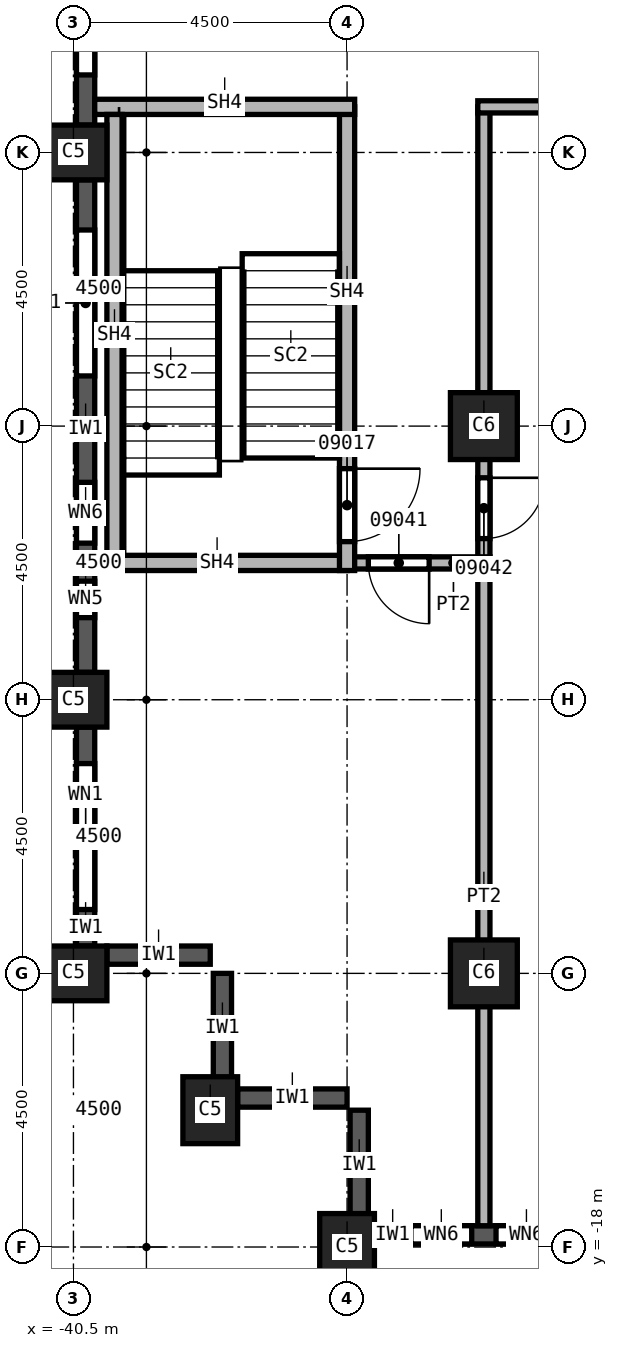
"""IFC4 building model, lengths in metres.
Left out: names, types, materials, properties, quantities, classifications, styles, units other than length and angle.
Written with IfcOpenShell. Run it as: python <this file> out.ifc"""

import sys

from ifc_helpers import new_model, si_unit, direction, frame, frame_2d, origin, origin_2d, place, context, subcontext, project, spatial, rectangle, extrude, element, fill, save


model = new_model("IFC4")
c1 = context("Model", 3, precision=1e-05, world=origin(), true_north=direction((0.0, 1.0)))
c2 = subcontext(c1, "Body", "Model", "MODEL_VIEW")
j1 = project(units=[si_unit("LENGTHUNIT", "METRE"), si_unit("PLANEANGLEUNIT", "RADIAN")], contexts=[c1])
p1 = place(None, origin())
s1 = spatial("IfcSite", under=j1, at=p1, CompositionType="ELEMENT")
p2 = place(p1, origin())
s2 = spatial("IfcBuilding", under=s1, at=p2, CompositionType="ELEMENT")
p3 = place(p2, frame((0.0, 0.0, 162.0)))
s3 = spatial("IfcBuildingStorey", under=s2, at=p3, CompositionType="ELEMENT", Elevation=162.0)
for number, where, z_axis, x_axis in (
    (1, (-40.5, 0.0, 0.0), (0.0, 0.0, 1.0), (0.0, 1.0, 0.0)),
    (2, (-40.5, -9.0, 0.0), (0.0, 0.0, 1.0), (0.0, 1.0, 0.0)),
    (3, (-40.5, -13.5, 0.0), (0.0, 0.0, 1.0), (0.0, 1.0, 0.0)),
    (4, (-38.25, -15.75, 0.0), (0.0, 0.0, 1.0), (1.0, 0.0, 0.0)),
    (5, (-36.0, -18.0, 0.0), (0.0, 0.0, 1.0), (1.0, 0.0, 0.0)),
):
    element("IfcColumn", number, at=place(p3, frame(where, z_axis=z_axis, x_axis=x_axis)), inside=s3, PredefinedType="COLUMN", context=c2, shape_type="SweptSolid", body=[
        extrude(rectangle(XDim=0.9, YDim=1.1, at=origin_2d()), origin(), (0.0, 0.0, 1.0), 3.7),
    ])
for number, where, z_axis, x_axis in (
    (6, (-33.75, -4.5, 0.0), (0.0, 0.0, 1.0), (1.0, 0.0, 0.0)),
    (7, (-33.75, -13.5, 0.0), (0.0, 0.0, 1.0), (1.0, 0.0, 0.0)),
):
    element("IfcColumn", number, at=place(p3, frame(where, z_axis=z_axis, x_axis=x_axis)), inside=s3, PredefinedType="COLUMN", context=c2, shape_type="SweptSolid", body=[
        extrude(rectangle(XDim=1.1, YDim=1.1, at=origin_2d()), origin(), (0.0, 0.0, 1.0), 3.7),
    ])
p4 = place(p3, frame((-39.95, -13.2, 0.0), z_axis=(0.0, 0.0, 1.0), x_axis=(1.0, 0.0, 0.0)))
e8 = element("IfcWall", 8, at=p4, inside=s3, PredefinedType="SOLIDWALL", context=c2, shape_type="SweptSolid", body=[
    extrude(rectangle(XDim=1.7, YDim=0.3, at=frame_2d((0.85, 0.0))), origin(), (0.0, 0.0, 1.0), 3.1),
])
for number, where, z_axis, x_axis in (
    (9, (-38.05, -15.3, 0.0), (0.0, 0.0, 1.0), (0.0, 1.0, 0.0)),
    (10, (-37.8, -15.55, 0.0), (0.0, 0.0, 1.0), (1.0, 0.0, 0.0)),
    (11, (-35.8, -17.55, 0.0), (0.0, 0.0, 1.0), (0.0, 1.0, 0.0)),
):
    element("IfcWall", number, at=place(p3, frame(where, z_axis=z_axis, x_axis=x_axis)), inside=s3, PredefinedType="SOLIDWALL", context=c2, shape_type="SweptSolid", body=[
        extrude(rectangle(XDim=1.8, YDim=0.3, at=frame_2d((0.9, 0.0))), origin(), (0.0, 0.0, 1.0), 3.1),
    ])
p5 = place(p3, frame((-40.3, 8.55, 0.0), z_axis=(0.0, 0.0, 1.0), x_axis=(0.0, -1.0, 0.0)))
e12 = element("IfcWall", 12, at=p5, inside=s3, PredefinedType="SOLIDWALL", context=c2, shape_type="SweptSolid", body=[
    extrude(rectangle(XDim=8.1, YDim=0.3, at=frame_2d((4.05, 0.0))), origin(), (0.0, 0.0, 1.0), 3.1),
])
p6 = place(p5, frame((0.825, 0.0, 0.8)))
e13 = element("IfcOpeningElement", 13, at=p6, cuts=e12, PredefinedType="OPENING", context=c2, shape_type="SweptSolid", body=[
    extrude(rectangle(XDim=2.4, YDim=1.95, at=frame_2d((1.2, 0.975))), frame((0.0, 0.15, 0.0), z_axis=(0.0, -1.0, 0.0), x_axis=(1.0, 0.0, 0.0)), (0.0, 0.0, 1.0), 0.3),
])
p7 = place(p5, frame((4.875, 0.0, 0.8)))
e14 = element("IfcOpeningElement", 14, at=p7, cuts=e12, PredefinedType="OPENING", context=c2, shape_type="SweptSolid", body=[
    extrude(rectangle(XDim=2.4, YDim=1.95, at=frame_2d((1.2, 0.975))), frame((0.0, 0.15, 0.0), z_axis=(0.0, -1.0, 0.0), x_axis=(1.0, 0.0, 0.0)), (0.0, 0.0, 1.0), 0.3),
])
p8 = place(p3, frame((-40.3, -0.45, 0.0), z_axis=(0.0, 0.0, 1.0), x_axis=(0.0, -1.0, 0.0)))
e15 = element("IfcWall", 15, at=p8, inside=s3, PredefinedType="SOLIDWALL", context=c2, shape_type="SweptSolid", body=[
    extrude(rectangle(XDim=8.1, YDim=0.3, at=frame_2d((4.05, 0.0))), origin(), (0.0, 0.0, 1.0), 3.1),
])
p9 = place(p8, frame((0.825, 0.0, 0.8)))
e16 = element("IfcOpeningElement", 16, at=p9, cuts=e15, PredefinedType="OPENING", context=c2, shape_type="SweptSolid", body=[
    extrude(rectangle(XDim=2.4, YDim=1.95, at=frame_2d((1.2, 0.975))), frame((0.0, 0.15, 0.0), z_axis=(0.0, -1.0, 0.0), x_axis=(1.0, 0.0, 0.0)), (0.0, 0.0, 1.0), 0.3),
])
p10 = place(p8, frame((4.975, 0.0, 0.8)))
e17 = element("IfcOpeningElement", 17, at=p10, cuts=e15, PredefinedType="OPENING", context=c2, shape_type="SweptSolid", body=[
    extrude(rectangle(XDim=1.0, YDim=1.95, at=frame_2d((0.5, 0.975))), frame((0.0, 0.15, 0.0), z_axis=(0.0, -1.0, 0.0), x_axis=(1.0, 0.0, 0.0)), (0.0, 0.0, 1.0), 0.3),
])
p11 = place(p8, frame((6.6, 0.0, 0.8)))
e18 = element("IfcOpeningElement", 18, at=p11, cuts=e15, PredefinedType="OPENING", context=c2, shape_type="SweptSolid", body=[
    extrude(rectangle(XDim=0.6, YDim=1.95, at=frame_2d((0.3, 0.975))), frame((0.0, 0.15, 0.0), z_axis=(0.0, -1.0, 0.0), x_axis=(1.0, 0.0, 0.0)), (0.0, 0.0, 1.0), 0.3),
])
p12 = place(p3, frame((-40.3, -9.45, 0.0), z_axis=(0.0, 0.0, 1.0), x_axis=(0.0, -1.0, 0.0)))
e19 = element("IfcWall", 19, at=p12, inside=s3, PredefinedType="SOLIDWALL", context=c2, shape_type="SweptSolid", body=[
    extrude(rectangle(XDim=3.6, YDim=0.3, at=frame_2d((1.8, 0.0))), origin(), (0.0, 0.0, 1.0), 3.1),
])
p13 = place(p12, frame((0.6, 0.0, 0.8)))
e20 = element("IfcOpeningElement", 20, at=p13, cuts=e19, PredefinedType="OPENING", context=c2, shape_type="SweptSolid", body=[
    extrude(rectangle(XDim=2.4, YDim=1.95, at=frame_2d((1.2, 0.975))), frame((0.0, 0.15, 0.0), z_axis=(0.0, -1.0, 0.0), x_axis=(1.0, 0.0, 0.0)), (0.0, 0.0, 1.0), 0.3),
])
p14 = place(p3, frame((-35.55, -17.8, 0.0), z_axis=(0.0, 0.0, 1.0), x_axis=(1.0, 0.0, 0.0)))
e21 = element("IfcWall", 21, at=p14, inside=s3, PredefinedType="SOLIDWALL", context=c2, shape_type="SweptSolid", body=[
    extrude(rectangle(XDim=3.6, YDim=0.3, at=frame_2d((1.8, 0.0))), origin(), (0.0, 0.0, 1.0), 3.1),
])
p15 = place(p14, frame((0.6, 0.0, 0.8)))
e22 = element("IfcOpeningElement", 22, at=p15, cuts=e21, PredefinedType="OPENING", context=c2, shape_type="SweptSolid", body=[
    extrude(rectangle(XDim=1.0, YDim=1.95, at=frame_2d((0.5, 0.975))), frame((0.0, 0.15, 0.0), z_axis=(0.0, -1.0, 0.0), x_axis=(1.0, 0.0, 0.0)), (0.0, 0.0, 1.0), 0.3),
])
p16 = place(p14, frame((2.0, 0.0, 0.8)))
e23 = element("IfcOpeningElement", 23, at=p16, cuts=e21, PredefinedType="OPENING", context=c2, shape_type="SweptSolid", body=[
    extrude(rectangle(XDim=1.0, YDim=1.95, at=frame_2d((0.5, 0.975))), frame((0.0, 0.15, 0.0), z_axis=(0.0, -1.0, 0.0), x_axis=(1.0, 0.0, 0.0)), (0.0, 0.0, 1.0), 0.3),
])
p17 = place(p3, frame((-33.75, 0.75, 0.0), z_axis=(0.0, 0.0, 1.0), x_axis=(0.0, -1.0, 0.0)))
e24 = element("IfcWall", 24, at=p17, inside=s3, PredefinedType="PARTITIONING", context=c2, shape_type="SweptSolid", body=[
    extrude(rectangle(XDim=18.4, YDim=0.2, at=frame_2d((9.2, 0.0))), origin(), (0.0, 0.0, 1.0), 3.7),
])
p18 = place(p17, frame((6.1, 0.0, 0.0)))
e25 = element("IfcOpeningElement", 25, at=p18, cuts=e24, PredefinedType="OPENING", context=c2, shape_type="SweptSolid", body=[
    extrude(rectangle(XDim=1.0, YDim=2.1, at=frame_2d((0.5, 1.05))), frame((0.0, 0.1, 0.0), z_axis=(0.0, -1.0, 0.0), x_axis=(1.0, 0.0, 0.0)), (0.0, 0.0, 1.0), 0.2),
])
p19 = place(p3, frame((-33.65, -6.75, 0.0), z_axis=(0.0, 0.0, 1.0), x_axis=(-1.0, 0.0, 0.0)))
e26 = element("IfcWall", 26, at=p19, inside=s3, PredefinedType="PARTITIONING", context=c2, shape_type="SweptSolid", body=[
    extrude(rectangle(XDim=2.35, YDim=0.2, at=frame_2d((1.175, 0.0))), origin(), (0.0, 0.0, 1.0), 3.7),
])
p20 = place(p19, frame((1.0, 0.0, 0.0)))
e27 = element("IfcOpeningElement", 27, at=p20, cuts=e26, PredefinedType="OPENING", context=c2, shape_type="SweptSolid", body=[
    extrude(rectangle(XDim=1.0, YDim=2.1, at=frame_2d((0.5, 1.05))), frame((0.0, 0.1, 0.0), z_axis=(0.0, -1.0, 0.0), x_axis=(1.0, 0.0, 0.0)), (0.0, 0.0, 1.0), 0.2),
])
p21 = place(p3, frame((-15.4, 0.75, 0.0), z_axis=(0.0, 0.0, 1.0), x_axis=(-1.0, 0.0, 0.0)))
e28 = element("IfcWall", 28, at=p21, inside=s3, PredefinedType="PARTITIONING", context=c2, shape_type="SweptSolid", body=[
    extrude(rectangle(XDim=18.45, YDim=0.2, at=frame_2d((9.225, 0.0))), origin(), (0.0, 0.0, 1.0), 3.7),
])
p22 = place(p21, frame((5.35, 0.0, 0.0)))
e29 = element("IfcOpeningElement", 29, at=p22, cuts=e28, PredefinedType="OPENING", context=c2, shape_type="SweptSolid", body=[
    extrude(rectangle(XDim=1.0, YDim=2.1, at=frame_2d((0.5, 1.05))), frame((0.0, 0.1, 0.0), z_axis=(0.0, -1.0, 0.0), x_axis=(1.0, 0.0, 0.0)), (0.0, 0.0, 1.0), 0.2),
])
p23 = place(p3, frame((-36.0, -6.75, 0.0), z_axis=(0.0, 0.0, 1.0), x_axis=(-1.0, 0.0, 0.0)))
e30 = element("IfcWall", 30, at=p23, inside=s3, PredefinedType="SOLIDWALL", context=c2, shape_type="SweptSolid", body=[
    extrude(rectangle(XDim=4.15, YDim=0.25, at=frame_2d((2.075, 0.0))), origin(), (0.0, 0.0, 1.0), 3.7),
])
p24 = place(p3, frame((-36.0, 0.75, 0.0), z_axis=(0.0, 0.0, 1.0), x_axis=(0.0, -1.0, 0.0)))
e31 = element("IfcWall", 31, at=p24, inside=s3, PredefinedType="SOLIDWALL", context=c2, shape_type="SweptSolid", body=[
    extrude(rectangle(XDim=7.625, YDim=0.25, at=frame_2d((3.812, 0.0))), origin(), (0.0, 0.0, 1.0), 3.7),
])
p25 = place(p24, frame((5.95, 0.0, 0.0)))
e32 = element("IfcOpeningElement", 32, at=p25, cuts=e31, PredefinedType="OPENING", context=c2, shape_type="SweptSolid", body=[
    extrude(rectangle(XDim=1.2, YDim=2.1, at=frame_2d((0.6, 1.05))), frame((0.0, 0.125, 0.0), z_axis=(0.0, -1.0, 0.0), x_axis=(1.0, 0.0, 0.0)), (0.0, 0.0, 1.0), 0.25),
])
p26 = place(p3, frame((-35.875, 0.75, 0.0), z_axis=(0.0, 0.0, 1.0), x_axis=(-1.0, 0.0, 0.0)))
e33 = element("IfcWall", 33, at=p26, inside=s3, PredefinedType="SOLIDWALL", context=c2, shape_type="SweptSolid", body=[
    extrude(rectangle(XDim=4.275, YDim=0.25, at=frame_2d((2.137, 0.0))), origin(), (0.0, 0.0, 1.0), 3.7),
])
p27 = place(p3, frame((-39.825, -6.625, 0.0), z_axis=(0.0, 0.0, 1.0), x_axis=(0.0, 1.0, 0.0)))
e34 = element("IfcWall", 34, at=p27, inside=s3, PredefinedType="SOLIDWALL", context=c2, shape_type="SweptSolid", body=[
    extrude(rectangle(XDim=7.25, YDim=0.25, at=frame_2d((3.625, 0.0))), origin(), (0.0, 0.0, 1.0), 3.7),
])
p28 = place(p7, origin())
e35 = element("IfcWindow", 35, at=p28, inside=s3, PartitioningType="SINGLE_PANEL", PredefinedType="WINDOW", context=c2, shape_type="SweptSolid", body=[
    extrude(rectangle(XDim=2.4, YDim=1.95, at=frame_2d((1.2, 0.975))), frame((0.0, 0.03, 0.0), z_axis=(0.0, -1.0, 0.0), x_axis=(1.0, 0.0, 0.0)), (0.0, 0.0, 1.0), 0.06),
])
fill(e14, e35)
p29 = place(p9, origin())
e36 = element("IfcWindow", 36, at=p29, inside=s3, PartitioningType="SINGLE_PANEL", PredefinedType="WINDOW", context=c2, shape_type="SweptSolid", body=[
    extrude(rectangle(XDim=2.4, YDim=1.95, at=frame_2d((1.2, 0.975))), frame((0.0, 0.03, 0.0), z_axis=(0.0, -1.0, 0.0), x_axis=(1.0, 0.0, 0.0)), (0.0, 0.0, 1.0), 0.06),
])
fill(e16, e36)
p30 = place(p13, origin())
e37 = element("IfcWindow", 37, at=p30, inside=s3, PartitioningType="SINGLE_PANEL", PredefinedType="WINDOW", context=c2, shape_type="SweptSolid", body=[
    extrude(rectangle(XDim=2.4, YDim=1.95, at=frame_2d((1.2, 0.975))), frame((0.0, 0.03, 0.0), z_axis=(0.0, -1.0, 0.0), x_axis=(1.0, 0.0, 0.0)), (0.0, 0.0, 1.0), 0.06),
])
fill(e20, e37)
p31 = place(p25, origin())
e38 = element("IfcDoor", 38, at=p31, inside=s3, OperationType="SINGLE_SWING_RIGHT", PredefinedType="DOOR", context=c2, shape_type="SweptSolid", body=[
    extrude(rectangle(XDim=1.2, YDim=2.1, at=frame_2d((0.6, 1.05))), frame((0.0, 0.025, 0.0), z_axis=(0.0, -1.0, 0.0), x_axis=(1.0, 0.0, 0.0)), (0.0, 0.0, 1.0), 0.05),
])
fill(e32, e38)
p32 = place(p20, origin())
e39 = element("IfcDoor", 39, at=p32, inside=s3, OperationType="SINGLE_SWING_RIGHT", PredefinedType="DOOR", context=c2, shape_type="SweptSolid", body=[
    extrude(rectangle(XDim=1.0, YDim=2.1, at=frame_2d((0.5, 1.05))), frame((0.0, 0.025, 0.0), z_axis=(0.0, -1.0, 0.0), x_axis=(1.0, 0.0, 0.0)), (0.0, 0.0, 1.0), 0.05),
])
fill(e27, e39)
p33 = place(p18, origin())
e40 = element("IfcDoor", 40, at=p33, inside=s3, OperationType="SINGLE_SWING_LEFT", PredefinedType="DOOR", context=c2, shape_type="SweptSolid", body=[
    extrude(rectangle(XDim=1.0, YDim=2.1, at=frame_2d((0.5, 1.05))), frame((0.0, 0.025, 0.0), z_axis=(0.0, -1.0, 0.0), x_axis=(1.0, 0.0, 0.0)), (0.0, 0.0, 1.0), 0.05),
])
fill(e25, e40)
p34 = place(p10, origin())
e41 = element("IfcWindow", 41, at=p34, inside=s3, PartitioningType="SINGLE_PANEL", PredefinedType="WINDOW", context=c2, shape_type="SweptSolid", body=[
    extrude(rectangle(XDim=1.0, YDim=1.95, at=frame_2d((0.5, 0.975))), frame((0.0, 0.03, 0.0), z_axis=(0.0, -1.0, 0.0), x_axis=(1.0, 0.0, 0.0)), (0.0, 0.0, 1.0), 0.06),
])
fill(e17, e41)
p35 = place(p11, origin())
e42 = element("IfcWindow", 42, at=p35, inside=s3, PartitioningType="SINGLE_PANEL", PredefinedType="WINDOW", context=c2, shape_type="SweptSolid", body=[
    extrude(rectangle(XDim=0.6, YDim=1.95, at=frame_2d((0.3, 0.975))), frame((0.0, 0.03, 0.0), z_axis=(0.0, -1.0, 0.0), x_axis=(1.0, 0.0, 0.0)), (0.0, 0.0, 1.0), 0.06),
])
fill(e18, e42)
p36 = place(p15, origin())
e43 = element("IfcWindow", 43, at=p36, inside=s3, PartitioningType="SINGLE_PANEL", PredefinedType="WINDOW", context=c2, shape_type="SweptSolid", body=[
    extrude(rectangle(XDim=1.0, YDim=1.95, at=frame_2d((0.5, 0.975))), frame((0.0, 0.03, 0.0), z_axis=(0.0, -1.0, 0.0), x_axis=(1.0, 0.0, 0.0)), (0.0, 0.0, 1.0), 0.06),
])
fill(e22, e43)
p37 = place(p16, origin())
e44 = element("IfcWindow", 44, at=p37, inside=s3, PartitioningType="SINGLE_PANEL", PredefinedType="WINDOW", context=c2, shape_type="SweptSolid", body=[
    extrude(rectangle(XDim=1.0, YDim=1.95, at=frame_2d((0.5, 0.975))), frame((0.0, 0.03, 0.0), z_axis=(0.0, -1.0, 0.0), x_axis=(1.0, 0.0, 0.0)), (0.0, 0.0, 1.0), 0.06),
])
fill(e23, e44)
save(model, sys.argv[1])
